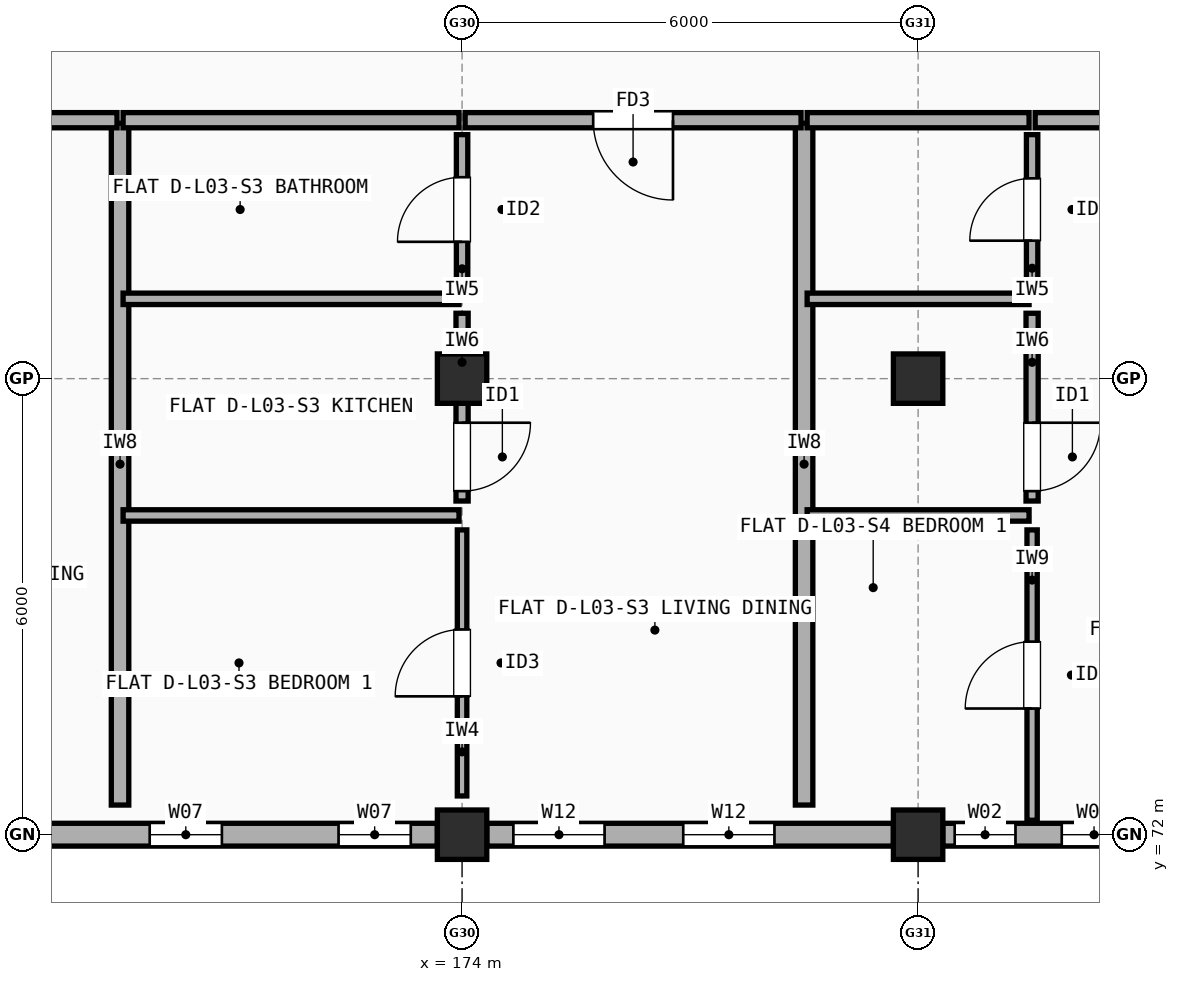
"""IFC4 building model, lengths in metres.
Left out: names, types, materials, properties, quantities, classifications, styles, units other than length and angle.
Written with IfcOpenShell. Run it as: python <this file> out.ifc"""

import sys

from ifc_helpers import new_model, si_unit, direction, frame, frame_2d, origin, origin_2d, place, context, subcontext, project, spatial, rectangle, extrude, element, fill, save


model = new_model("IFC4")
c1 = context("Model", 3, precision=1e-05, world=origin(), true_north=direction((0.0, 1.0)))
c2 = subcontext(c1, "Body", "Model", "MODEL_VIEW")
j1 = project(units=[si_unit("LENGTHUNIT", "METRE"), si_unit("PLANEANGLEUNIT", "RADIAN")], contexts=[c1])
p1 = place(None, origin())
s1 = spatial("IfcSite", under=j1, at=p1, CompositionType="ELEMENT")
p2 = place(p1, origin())
s2 = spatial("IfcBuilding", under=s1, at=p2, CompositionType="ELEMENT")
p3 = place(p2, frame((0.0, 0.0, 10.9)))
s3 = spatial("IfcBuildingStorey", under=s2, at=p3, CompositionType="ELEMENT", Elevation=10.9)
for number, where, z_axis, x_axis in (
    (1, (174.0, 72.0, 0.0), (0.0, 0.0, 1.0), (1.0, 0.0, 0.0)),
    (2, (174.0, 78.0, 0.0), (0.0, 0.0, 1.0), (1.0, 0.0, 0.0)),
    (3, (180.0, 72.0, 0.0), (0.0, 0.0, 1.0), (1.0, 0.0, 0.0)),
    (4, (180.0, 78.0, 0.0), (0.0, 0.0, 1.0), (1.0, 0.0, 0.0)),
):
    element("IfcColumn", number, at=place(p3, frame(where, z_axis=z_axis, x_axis=x_axis)), inside=s3, PredefinedType="COLUMN", context=c2, shape_type="SweptSolid", body=[
        extrude(rectangle(XDim=0.65, YDim=0.65, at=origin_2d()), origin(), (0.0, 0.0, 1.0), 2.96),
    ])
p4 = place(p3, frame((168.325, 72.0, 0.0), z_axis=(0.0, 0.0, 1.0), x_axis=(1.0, 0.0, 0.0)))
e5 = element("IfcWall", 5, at=p4, inside=s3, PredefinedType="STANDARD", context=c2, shape_type="SweptSolid", body=[
    extrude(rectangle(XDim=5.35, YDim=0.3, at=frame_2d((2.675, 0.0))), origin(), (0.0, 0.0, 1.0), 2.442),
])
p5 = place(p4, frame((1.565, 0.0, 0.9)))
e6 = element("IfcOpeningElement", 6, at=p5, cuts=e5, PredefinedType="OPENING", context=c2, shape_type="SweptSolid", body=[
    extrude(rectangle(XDim=0.95, YDim=1.35, at=frame_2d((0.475, 0.675))), frame((0.0, 0.16, 0.0), z_axis=(0.0, -1.0, 0.0), x_axis=(1.0, 0.0, 0.0)), (0.0, 0.0, 1.0), 0.32),
])
p6 = place(p4, frame((4.05, 0.0, 0.9)))
e7 = element("IfcOpeningElement", 7, at=p6, cuts=e5, PredefinedType="OPENING", context=c2, shape_type="SweptSolid", body=[
    extrude(rectangle(XDim=0.95, YDim=1.35, at=frame_2d((0.475, 0.675))), frame((0.0, 0.16, 0.0), z_axis=(0.0, -1.0, 0.0), x_axis=(1.0, 0.0, 0.0)), (0.0, 0.0, 1.0), 0.32),
])
p7 = place(p3, frame((174.325, 72.0, 0.0), z_axis=(0.0, 0.0, 1.0), x_axis=(1.0, 0.0, 0.0)))
e8 = element("IfcWall", 8, at=p7, inside=s3, PredefinedType="STANDARD", context=c2, shape_type="SweptSolid", body=[
    extrude(rectangle(XDim=5.35, YDim=0.3, at=frame_2d((2.675, 0.0))), origin(), (0.0, 0.0, 1.0), 2.442),
])
p8 = place(p7, frame((0.35, 0.0, 0.9)))
e9 = element("IfcOpeningElement", 9, at=p8, cuts=e8, PredefinedType="OPENING", context=c2, shape_type="SweptSolid", body=[
    extrude(rectangle(XDim=1.2, YDim=1.35, at=frame_2d((0.6, 0.675))), frame((0.0, 0.16, 0.0), z_axis=(0.0, -1.0, 0.0), x_axis=(1.0, 0.0, 0.0)), (0.0, 0.0, 1.0), 0.32),
])
p9 = place(p7, frame((2.585, 0.0, 0.9)))
e10 = element("IfcOpeningElement", 10, at=p9, cuts=e8, PredefinedType="OPENING", context=c2, shape_type="SweptSolid", body=[
    extrude(rectangle(XDim=1.2, YDim=1.35, at=frame_2d((0.6, 0.675))), frame((0.0, 0.16, 0.0), z_axis=(0.0, -1.0, 0.0), x_axis=(1.0, 0.0, 0.0)), (0.0, 0.0, 1.0), 0.32),
])
p10 = place(p3, frame((180.325, 72.0, 0.0), z_axis=(0.0, 0.0, 1.0), x_axis=(1.0, 0.0, 0.0)))
e11 = element("IfcWall", 11, at=p10, inside=s3, PredefinedType="STANDARD", context=c2, shape_type="SweptSolid", body=[
    extrude(rectangle(XDim=5.4, YDim=0.3, at=frame_2d((2.7, 0.0))), origin(), (0.0, 0.0, 1.0), 2.442),
])
p11 = place(p10, frame((1.565, 0.0, 0.9)))
e12 = element("IfcOpeningElement", 12, at=p11, cuts=e11, PredefinedType="OPENING", context=c2, shape_type="SweptSolid", body=[
    extrude(rectangle(XDim=0.85, YDim=1.25, at=frame_2d((0.425, 0.625))), frame((0.0, 0.16, 0.0), z_axis=(0.0, -1.0, 0.0), x_axis=(1.0, 0.0, 0.0)), (0.0, 0.0, 1.0), 0.32),
])
p12 = place(p10, frame((4.2, 0.0, 0.9)))
e13 = element("IfcOpeningElement", 13, at=p12, cuts=e11, PredefinedType="OPENING", context=c2, shape_type="SweptSolid", body=[
    extrude(rectangle(XDim=0.85, YDim=1.25, at=frame_2d((0.425, 0.625))), frame((0.0, 0.16, 0.0), z_axis=(0.0, -1.0, 0.0), x_axis=(1.0, 0.0, 0.0)), (0.0, 0.0, 1.0), 0.32),
])
p13 = place(p10, frame((0.156, 0.0, 0.9)))
e14 = element("IfcOpeningElement", 14, at=p13, cuts=e11, PredefinedType="OPENING", context=c2, shape_type="SweptSolid", body=[
    extrude(rectangle(XDim=0.8, YDim=1.2, at=frame_2d((0.4, 0.6))), frame((0.0, 0.16, 0.0), z_axis=(0.0, -1.0, 0.0), x_axis=(1.0, 0.0, 0.0)), (0.0, 0.0, 1.0), 0.32),
])
p14 = place(p3, frame((169.5, 72.39, 0.0), z_axis=(0.0, 0.0, 1.0), x_axis=(0.0, 1.0, 0.0)))
e15 = element("IfcWall", 15, at=p14, inside=s3, PredefinedType="SOLIDWALL", context=c2, shape_type="SweptSolid", body=[
    extrude(rectangle(XDim=8.97, YDim=0.23, at=frame_2d((4.485, 0.0))), origin(), (0.0, 0.0, 1.0), 2.442),
])
p15 = place(p3, frame((165.04, 81.4, 0.0), z_axis=(0.0, 0.0, 1.0), x_axis=(1.0, 0.0, 0.0)))
e16 = element("IfcWall", 16, at=p15, inside=s3, PredefinedType="SOLIDWALL", context=c2, shape_type="SweptSolid", body=[
    extrude(rectangle(XDim=4.42, YDim=0.2, at=frame_2d((2.21, 0.0))), origin(), (0.0, 0.0, 1.0), 2.458),
])
p16 = place(p15, frame((1.72, 0.0, 0.0)))
e17 = element("IfcOpeningElement", 17, at=p16, cuts=e16, PredefinedType="OPENING", context=c2, shape_type="SweptSolid", body=[
    extrude(rectangle(XDim=0.98, YDim=2.15, at=frame_2d((0.49, 1.075))), frame((0.0, 0.11, 0.0), z_axis=(0.0, -1.0, 0.0), x_axis=(1.0, 0.0, 0.0)), (0.0, 0.0, 1.0), 0.22),
])
p17 = place(p3, frame((178.5, 72.39, 0.0), z_axis=(0.0, 0.0, 1.0), x_axis=(0.0, 1.0, 0.0)))
e18 = element("IfcWall", 18, at=p17, inside=s3, PredefinedType="SOLIDWALL", context=c2, shape_type="SweptSolid", body=[
    extrude(rectangle(XDim=8.97, YDim=0.23, at=frame_2d((4.485, 0.0))), origin(), (0.0, 0.0, 1.0), 2.442),
])
p18 = place(p3, frame((169.54, 81.4, 0.0), z_axis=(0.0, 0.0, 1.0), x_axis=(1.0, 0.0, 0.0)))
e19 = element("IfcWall", 19, at=p18, inside=s3, PredefinedType="SOLIDWALL", context=c2, shape_type="SweptSolid", body=[
    extrude(rectangle(XDim=4.42, YDim=0.2, at=frame_2d((2.21, 0.0))), origin(), (0.0, 0.0, 1.0), 2.508),
])
p19 = place(p3, frame((174.04, 81.4, 0.0), z_axis=(0.0, 0.0, 1.0), x_axis=(1.0, 0.0, 0.0)))
e20 = element("IfcWall", 20, at=p19, inside=s3, PredefinedType="SOLIDWALL", context=c2, shape_type="SweptSolid", body=[
    extrude(rectangle(XDim=4.42, YDim=0.2, at=frame_2d((2.21, 0.0))), origin(), (0.0, 0.0, 1.0), 2.508),
])
p20 = place(p19, frame((1.685, 0.0, 0.0)))
e21 = element("IfcOpeningElement", 21, at=p20, cuts=e20, PredefinedType="OPENING", context=c2, shape_type="SweptSolid", body=[
    extrude(rectangle(XDim=1.05, YDim=2.15, at=frame_2d((0.525, 1.075))), frame((0.0, 0.11, 0.0), z_axis=(0.0, -1.0, 0.0), x_axis=(1.0, 0.0, 0.0)), (0.0, 0.0, 1.0), 0.22),
])
p21 = place(p3, frame((174.0, 72.51, 0.0), z_axis=(0.0, 0.0, 1.0), x_axis=(0.0, 1.0, 0.0)))
e22 = element("IfcWall", 22, at=p21, inside=s3, PredefinedType="PARTITIONING", context=c2, shape_type="SweptSolid", body=[
    extrude(rectangle(XDim=3.5, YDim=0.125, at=frame_2d((1.75, 0.0))), origin(), (0.0, 0.0, 1.0), 2.548),
])
p22 = place(p21, frame((1.31, 0.0, 0.0)))
e23 = element("IfcOpeningElement", 23, at=p22, cuts=e22, PredefinedType="OPENING", context=c2, shape_type="SweptSolid", body=[
    extrude(rectangle(XDim=0.88, YDim=2.1, at=frame_2d((0.44, 1.05))), frame((0.0, 0.073, 0.0), z_axis=(0.0, -1.0, 0.0), x_axis=(1.0, 0.0, 0.0)), (0.0, 0.0, 1.0), 0.145),
])
p23 = place(p3, frame((174.0, 76.39, 0.0), z_axis=(0.0, 0.0, 1.0), x_axis=(0.0, 1.0, 0.0)))
e24 = element("IfcWall", 24, at=p23, inside=s3, PredefinedType="PLUMBINGWALL", context=c2, shape_type="SweptSolid", body=[
    extrude(rectangle(XDim=2.47, YDim=0.16, at=frame_2d((1.235, 0.0))), origin(), (0.0, 0.0, 1.0), 2.508),
])
p24 = place(p23, frame((0.13, 0.0, 0.0)))
e25 = element("IfcOpeningElement", 25, at=p24, cuts=e24, PredefinedType="OPENING", context=c2, shape_type="SweptSolid", body=[
    extrude(rectangle(XDim=0.9, YDim=2.1, at=frame_2d((0.45, 1.05))), frame((0.0, 0.09, 0.0), z_axis=(0.0, -1.0, 0.0), x_axis=(1.0, 0.0, 0.0)), (0.0, 0.0, 1.0), 0.18),
])
p25 = place(p3, frame((174.0, 79.24, 0.0), z_axis=(0.0, 0.0, 1.0), x_axis=(0.0, 1.0, 0.0)))
e26 = element("IfcWall", 26, at=p25, inside=s3, PredefinedType="PARTITIONING", context=c2, shape_type="SweptSolid", body=[
    extrude(rectangle(XDim=1.97, YDim=0.15, at=frame_2d((0.985, 0.0))), origin(), (0.0, 0.0, 1.0), 2.508),
])
p26 = place(p25, frame((0.56, 0.0, 0.0)))
e27 = element("IfcOpeningElement", 27, at=p26, cuts=e26, PredefinedType="OPENING", context=c2, shape_type="SweptSolid", body=[
    extrude(rectangle(XDim=0.85, YDim=2.1, at=frame_2d((0.425, 1.05))), frame((0.0, 0.085, 0.0), z_axis=(0.0, -1.0, 0.0), x_axis=(1.0, 0.0, 0.0)), (0.0, 0.0, 1.0), 0.17),
])
p27 = place(p3, frame((169.54, 76.2, 0.0), z_axis=(0.0, 0.0, 1.0), x_axis=(1.0, 0.0, 0.0)))
e28 = element("IfcWall", 28, at=p27, inside=s3, PredefinedType="PARTITIONING", context=c2, shape_type="SweptSolid", body=[
    extrude(rectangle(XDim=4.42, YDim=0.15, at=frame_2d((2.21, 0.0))), origin(), (0.0, 0.0, 1.0), 2.548),
])
p28 = place(p3, frame((169.54, 79.05, 0.0), z_axis=(0.0, 0.0, 1.0), x_axis=(1.0, 0.0, 0.0)))
e29 = element("IfcWall", 29, at=p28, inside=s3, PredefinedType="PARTITIONING", context=c2, shape_type="SweptSolid", body=[
    extrude(rectangle(XDim=4.42, YDim=0.15, at=frame_2d((2.21, 0.0))), origin(), (0.0, 0.0, 1.0), 2.508),
])
p29 = place(p3, frame((178.54, 81.4, 0.0), z_axis=(0.0, 0.0, 1.0), x_axis=(1.0, 0.0, 0.0)))
e30 = element("IfcWall", 30, at=p29, inside=s3, PredefinedType="SOLIDWALL", context=c2, shape_type="SweptSolid", body=[
    extrude(rectangle(XDim=2.92, YDim=0.2, at=frame_2d((1.46, 0.0))), origin(), (0.0, 0.0, 1.0), 2.458),
])
p30 = place(p3, frame((181.54, 81.4, 0.0), z_axis=(0.0, 0.0, 1.0), x_axis=(1.0, 0.0, 0.0)))
e31 = element("IfcWall", 31, at=p30, inside=s3, PredefinedType="SOLIDWALL", context=c2, shape_type="SweptSolid", body=[
    extrude(rectangle(XDim=4.42, YDim=0.2, at=frame_2d((2.21, 0.0))), origin(), (0.0, 0.0, 1.0), 2.442),
])
p31 = place(p30, frame((1.71, 0.0, 0.0)))
e32 = element("IfcOpeningElement", 32, at=p31, cuts=e31, PredefinedType="OPENING", context=c2, shape_type="SweptSolid", body=[
    extrude(rectangle(XDim=1.0, YDim=2.15, at=frame_2d((0.5, 1.075))), frame((0.0, 0.11, 0.0), z_axis=(0.0, -1.0, 0.0), x_axis=(1.0, 0.0, 0.0)), (0.0, 0.0, 1.0), 0.22),
])
p32 = place(p3, frame((181.5, 72.19, 0.0), z_axis=(0.0, 0.0, 1.0), x_axis=(0.0, 1.0, 0.0)))
e33 = element("IfcWall", 33, at=p32, inside=s3, PredefinedType="PARTITIONING", context=c2, shape_type="SweptSolid", body=[
    extrude(rectangle(XDim=3.82, YDim=0.135, at=frame_2d((1.91, 0.0))), origin(), (0.0, 0.0, 1.0), 2.96),
])
p33 = place(p32, frame((1.47, 0.0, 0.0)))
e34 = element("IfcOpeningElement", 34, at=p33, cuts=e33, PredefinedType="OPENING", context=c2, shape_type="SweptSolid", body=[
    extrude(rectangle(XDim=0.88, YDim=2.1, at=frame_2d((0.44, 1.05))), frame((0.0, 0.077, 0.0), z_axis=(0.0, -1.0, 0.0), x_axis=(1.0, 0.0, 0.0)), (0.0, 0.0, 1.0), 0.155),
])
p34 = place(p3, frame((181.5, 76.39, 0.0), z_axis=(0.0, 0.0, 1.0), x_axis=(0.0, 1.0, 0.0)))
e35 = element("IfcWall", 35, at=p34, inside=s3, PredefinedType="PLUMBINGWALL", context=c2, shape_type="SweptSolid", body=[
    extrude(rectangle(XDim=2.47, YDim=0.16, at=frame_2d((1.235, 0.0))), origin(), (0.0, 0.0, 1.0), 2.442),
])
p35 = place(p34, frame((0.13, 0.0, 0.0)))
e36 = element("IfcOpeningElement", 36, at=p35, cuts=e35, PredefinedType="OPENING", context=c2, shape_type="SweptSolid", body=[
    extrude(rectangle(XDim=0.9, YDim=2.1, at=frame_2d((0.45, 1.05))), frame((0.0, 0.09, 0.0), z_axis=(0.0, -1.0, 0.0), x_axis=(1.0, 0.0, 0.0)), (0.0, 0.0, 1.0), 0.18),
])
p36 = place(p3, frame((181.5, 79.24, 0.0), z_axis=(0.0, 0.0, 1.0), x_axis=(0.0, 1.0, 0.0)))
e37 = element("IfcWall", 37, at=p36, inside=s3, PredefinedType="PARTITIONING", context=c2, shape_type="SweptSolid", body=[
    extrude(rectangle(XDim=1.97, YDim=0.15, at=frame_2d((0.985, 0.0))), origin(), (0.0, 0.0, 1.0), 2.96),
])
p37 = place(p36, frame((0.575, 0.0, 0.0)))
e38 = element("IfcOpeningElement", 38, at=p37, cuts=e37, PredefinedType="OPENING", context=c2, shape_type="SweptSolid", body=[
    extrude(rectangle(XDim=0.82, YDim=2.08, at=frame_2d((0.41, 1.04))), frame((0.0, 0.085, 0.0), z_axis=(0.0, -1.0, 0.0), x_axis=(1.0, 0.0, 0.0)), (0.0, 0.0, 1.0), 0.17),
])
p38 = place(p3, frame((178.54, 76.2, 0.0), z_axis=(0.0, 0.0, 1.0), x_axis=(1.0, 0.0, 0.0)))
e39 = element("IfcWall", 39, at=p38, inside=s3, PredefinedType="PARTITIONING", context=c2, shape_type="SweptSolid", body=[
    extrude(rectangle(XDim=2.92, YDim=0.15, at=frame_2d((1.46, 0.0))), origin(), (0.0, 0.0, 1.0), 2.508),
])
p39 = place(p3, frame((178.54, 79.05, 0.0), z_axis=(0.0, 0.0, 1.0), x_axis=(1.0, 0.0, 0.0)))
e40 = element("IfcWall", 40, at=p39, inside=s3, PredefinedType="PARTITIONING", context=c2, shape_type="SweptSolid", body=[
    extrude(rectangle(XDim=2.92, YDim=0.15, at=frame_2d((1.46, 0.0))), origin(), (0.0, 0.0, 1.0), 2.458),
])
p40 = place(p5, origin())
e41 = element("IfcWindow", 41, at=p40, inside=s3, PartitioningType="SINGLE_PANEL", PredefinedType="WINDOW", context=c2, shape_type="SweptSolid", body=[
    extrude(rectangle(XDim=0.95, YDim=1.35, at=frame_2d((0.475, 0.675))), frame((0.0, 0.03, 0.0), z_axis=(0.0, -1.0, 0.0), x_axis=(1.0, 0.0, 0.0)), (0.0, 0.0, 1.0), 0.06),
])
fill(e6, e41)
p41 = place(p6, origin())
e42 = element("IfcWindow", 42, at=p41, inside=s3, PartitioningType="SINGLE_PANEL", PredefinedType="WINDOW", context=c2, shape_type="SweptSolid", body=[
    extrude(rectangle(XDim=0.95, YDim=1.35, at=frame_2d((0.475, 0.675))), frame((0.0, 0.03, 0.0), z_axis=(0.0, -1.0, 0.0), x_axis=(1.0, 0.0, 0.0)), (0.0, 0.0, 1.0), 0.06),
])
fill(e7, e42)
p42 = place(p8, origin())
e43 = element("IfcWindow", 43, at=p42, inside=s3, PartitioningType="SINGLE_PANEL", PredefinedType="WINDOW", context=c2, shape_type="SweptSolid", body=[
    extrude(rectangle(XDim=1.2, YDim=1.35, at=frame_2d((0.6, 0.675))), frame((0.0, 0.03, 0.0), z_axis=(0.0, -1.0, 0.0), x_axis=(1.0, 0.0, 0.0)), (0.0, 0.0, 1.0), 0.06),
])
fill(e9, e43)
p43 = place(p9, origin())
e44 = element("IfcWindow", 44, at=p43, inside=s3, PartitioningType="SINGLE_PANEL", PredefinedType="WINDOW", context=c2, shape_type="SweptSolid", body=[
    extrude(rectangle(XDim=1.2, YDim=1.35, at=frame_2d((0.6, 0.675))), frame((0.0, 0.03, 0.0), z_axis=(0.0, -1.0, 0.0), x_axis=(1.0, 0.0, 0.0)), (0.0, 0.0, 1.0), 0.06),
])
fill(e10, e44)
p44 = place(p11, origin())
e45 = element("IfcWindow", 45, at=p44, inside=s3, PartitioningType="SINGLE_PANEL", PredefinedType="WINDOW", context=c2, shape_type="SweptSolid", body=[
    extrude(rectangle(XDim=0.85, YDim=1.25, at=frame_2d((0.425, 0.625))), frame((0.0, 0.03, 0.0), z_axis=(0.0, -1.0, 0.0), x_axis=(1.0, 0.0, 0.0)), (0.0, 0.0, 1.0), 0.06),
])
fill(e12, e45)
p45 = place(p13, origin())
e46 = element("IfcWindow", 46, at=p45, inside=s3, PartitioningType="SINGLE_PANEL", PredefinedType="WINDOW", context=c2, shape_type="SweptSolid", body=[
    extrude(rectangle(XDim=0.8, YDim=1.2, at=frame_2d((0.4, 0.6))), frame((0.0, 0.03, 0.0), z_axis=(0.0, -1.0, 0.0), x_axis=(1.0, 0.0, 0.0)), (0.0, 0.0, 1.0), 0.06),
])
fill(e14, e46)
p46 = place(p20, origin())
e47 = element("IfcDoor", 47, at=p46, inside=s3, OperationType="SINGLE_SWING_RIGHT", PredefinedType="DOOR", context=c2, shape_type="SweptSolid", body=[
    extrude(rectangle(XDim=1.05, YDim=2.15, at=frame_2d((0.525, 1.075))), frame((0.0, 0.025, 0.0), z_axis=(0.0, -1.0, 0.0), x_axis=(1.0, 0.0, 0.0)), (0.0, 0.0, 1.0), 0.05),
])
fill(e21, e47)
p47 = place(p22, origin())
e48 = element("IfcDoor", 48, at=p47, inside=s3, OperationType="SINGLE_SWING_LEFT", PredefinedType="DOOR", context=c2, shape_type="SweptSolid", body=[
    extrude(rectangle(XDim=0.88, YDim=2.1, at=frame_2d((0.44, 1.05))), frame((0.0, 0.025, 0.0), z_axis=(0.0, -1.0, 0.0), x_axis=(1.0, 0.0, 0.0)), (0.0, 0.0, 1.0), 0.05),
])
fill(e23, e48)
p48 = place(p24, origin())
e49 = element("IfcDoor", 49, at=p48, inside=s3, OperationType="SINGLE_SWING_RIGHT", PredefinedType="DOOR", context=c2, shape_type="SweptSolid", body=[
    extrude(rectangle(XDim=0.9, YDim=2.1, at=frame_2d((0.45, 1.05))), frame((0.0, 0.025, 0.0), z_axis=(0.0, -1.0, 0.0), x_axis=(1.0, 0.0, 0.0)), (0.0, 0.0, 1.0), 0.05),
])
fill(e25, e49)
p49 = place(p26, origin())
e50 = element("IfcDoor", 50, at=p49, inside=s3, OperationType="SINGLE_SWING_LEFT", PredefinedType="DOOR", context=c2, shape_type="SweptSolid", body=[
    extrude(rectangle(XDim=0.85, YDim=2.1, at=frame_2d((0.425, 1.05))), frame((0.0, 0.025, 0.0), z_axis=(0.0, -1.0, 0.0), x_axis=(1.0, 0.0, 0.0)), (0.0, 0.0, 1.0), 0.05),
])
fill(e27, e50)
p50 = place(p33, origin())
e51 = element("IfcDoor", 51, at=p50, inside=s3, OperationType="SINGLE_SWING_LEFT", PredefinedType="DOOR", context=c2, shape_type="SweptSolid", body=[
    extrude(rectangle(XDim=0.88, YDim=2.1, at=frame_2d((0.44, 1.05))), frame((0.0, 0.025, 0.0), z_axis=(0.0, -1.0, 0.0), x_axis=(1.0, 0.0, 0.0)), (0.0, 0.0, 1.0), 0.05),
])
fill(e34, e51)
p51 = place(p35, origin())
e52 = element("IfcDoor", 52, at=p51, inside=s3, OperationType="SINGLE_SWING_RIGHT", PredefinedType="DOOR", context=c2, shape_type="SweptSolid", body=[
    extrude(rectangle(XDim=0.9, YDim=2.1, at=frame_2d((0.45, 1.05))), frame((0.0, 0.025, 0.0), z_axis=(0.0, -1.0, 0.0), x_axis=(1.0, 0.0, 0.0)), (0.0, 0.0, 1.0), 0.05),
])
fill(e36, e52)
p52 = place(p37, origin())
e53 = element("IfcDoor", 53, at=p52, inside=s3, OperationType="SINGLE_SWING_LEFT", PredefinedType="DOOR", context=c2, shape_type="SweptSolid", body=[
    extrude(rectangle(XDim=0.82, YDim=2.08, at=frame_2d((0.41, 1.04))), frame((0.0, 0.025, 0.0), z_axis=(0.0, -1.0, 0.0), x_axis=(1.0, 0.0, 0.0)), (0.0, 0.0, 1.0), 0.05),
])
fill(e38, e53)
save(model, sys.argv[1])
